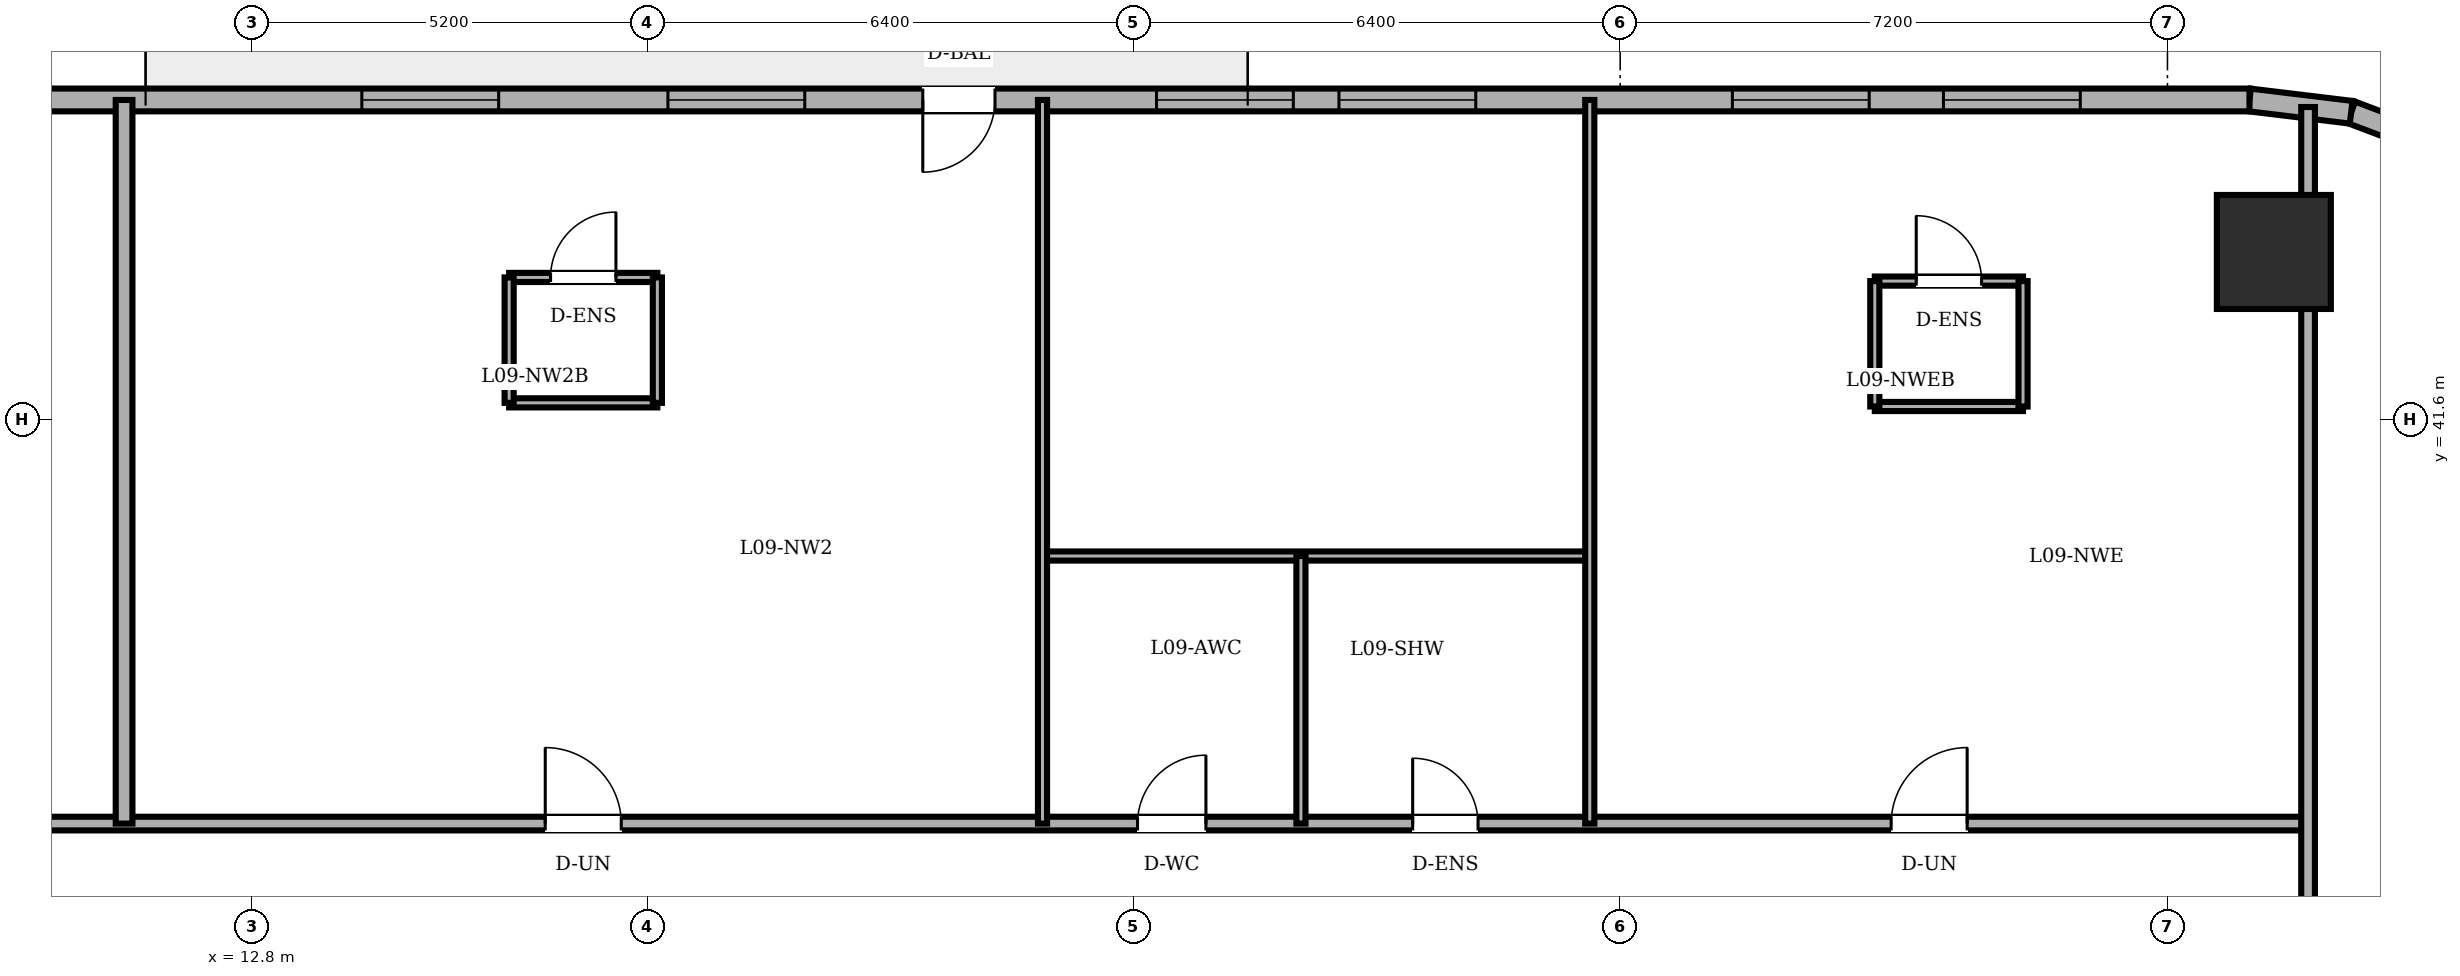
"""IFC4 building model, lengths in metres.
Left out: names, types, materials, properties, quantities, classifications, styles, units other than length and angle.
Written with IfcOpenShell. Run it as: python <this file> out.ifc"""

import sys

from ifc_helpers import new_model, si_unit, direction, frame, frame_2d, origin, origin_2d, place, context, subcontext, project, spatial, rectangle, circle, extrude, element, fill, save


model = new_model("IFC4")
c1 = context("Model", 3, precision=1e-05, world=origin(), true_north=direction((0.0, 1.0)))
c2 = subcontext(c1, "Body", "Model", "MODEL_VIEW")
j1 = project(units=[si_unit("LENGTHUNIT", "METRE"), si_unit("PLANEANGLEUNIT", "RADIAN")], contexts=[c1])
p1 = place(None, origin())
s1 = spatial("IfcSite", under=j1, at=p1, CompositionType="ELEMENT")
p2 = place(p1, origin())
s2 = spatial("IfcBuilding", under=s1, at=p2, CompositionType="ELEMENT")
p3 = place(p2, frame((0.0, 0.0, 36.0)))
s3 = spatial("IfcBuildingStorey", under=s2, at=p3, CompositionType="ELEMENT", Elevation=36.0)
p4 = place(p3, frame((39.4, 43.8, 0.0), z_axis=(0.0, 0.0, 1.0), x_axis=(1.0, 0.0, 0.0)))
e1 = element("IfcColumn", 1, at=p4, inside=s3, PredefinedType="COLUMN", context=c2, shape_type="SweptSolid", body=[
    extrude(circle(Radius=0.75, at=origin_2d()), origin(), (0.0, 0.0, 1.0), 3.6),
])
p5 = place(p3, frame((41.679, 45.16, 0.0), z_axis=(0.0, 0.0, 1.0), x_axis=(-0.935156721165, 0.354234254216, 0.0)))
e2 = element("IfcWall", 2, at=p5, inside=s3, PredefinedType="SOLIDWALL", context=c2, shape_type="SweptSolid", body=[
    extrude(rectangle(XDim=1.349, YDim=0.3, at=frame_2d((0.675, 0.0))), origin(), (0.0, 0.0, 1.0), 3.4),
])
p6 = place(p3, frame((40.417, 45.638, 0.0), z_axis=(0.0, 0.0, 1.0), x_axis=(-0.992739027259, 0.120288086515, 0.0)))
e3 = element("IfcWall", 3, at=p6, inside=s3, PredefinedType="SOLIDWALL", context=c2, shape_type="SweptSolid", body=[
    extrude(rectangle(XDim=1.348, YDim=0.3, at=frame_2d((0.674, 0.0))), origin(), (0.0, 0.0, 1.0), 3.4),
])
p7 = place(p3, frame((39.079, 45.8, 0.0), z_axis=(0.0, 0.0, 1.0), x_axis=(-1.0, 0.0, 0.0)))
e4 = element("IfcWall", 4, at=p7, inside=s3, PredefinedType="SOLIDWALL", context=c2, shape_type="SweptSolid", body=[
    extrude(rectangle(XDim=30.079, YDim=0.3, at=frame_2d((15.04, 0.0))), origin(), (0.0, 0.0, 1.0), 3.4),
])
p8 = place(p7, frame((16.504, 0.0, 0.0)))
e5 = element("IfcOpeningElement", 5, at=p8, cuts=e4, PredefinedType="OPENING", context=c2, shape_type="SweptSolid", body=[
    extrude(rectangle(XDim=0.95, YDim=2.2, at=frame_2d((0.475, 1.1))), frame((0.0, 0.16, 0.0), z_axis=(0.0, -1.0, 0.0), x_axis=(1.0, 0.0, 0.0)), (0.0, 0.0, 1.0), 0.32),
])
p9 = place(p7, frame((2.226, 0.0, 0.85)))
e6 = element("IfcOpeningElement", 6, at=p9, cuts=e4, PredefinedType="OPENING", context=c2, shape_type="SweptSolid", body=[
    extrude(rectangle(XDim=1.8, YDim=1.55, at=frame_2d((0.9, 0.775))), frame((0.0, 0.16, 0.0), z_axis=(0.0, -1.0, 0.0), x_axis=(1.0, 0.0, 0.0)), (0.0, 0.0, 1.0), 0.32),
])
p10 = place(p7, frame((5.003, 0.0, 0.85)))
e7 = element("IfcOpeningElement", 7, at=p10, cuts=e4, PredefinedType="OPENING", context=c2, shape_type="SweptSolid", body=[
    extrude(rectangle(XDim=1.8, YDim=1.55, at=frame_2d((0.9, 0.775))), frame((0.0, 0.16, 0.0), z_axis=(0.0, -1.0, 0.0), x_axis=(1.0, 0.0, 0.0)), (0.0, 0.0, 1.0), 0.32),
])
p11 = place(p7, frame((10.179, 0.0, 0.85)))
e8 = element("IfcOpeningElement", 8, at=p11, cuts=e4, PredefinedType="OPENING", context=c2, shape_type="SweptSolid", body=[
    extrude(rectangle(XDim=1.8, YDim=1.55, at=frame_2d((0.9, 0.775))), frame((0.0, 0.16, 0.0), z_axis=(0.0, -1.0, 0.0), x_axis=(1.0, 0.0, 0.0)), (0.0, 0.0, 1.0), 0.32),
])
p12 = place(p7, frame((12.579, 0.0, 0.85)))
e9 = element("IfcOpeningElement", 9, at=p12, cuts=e4, PredefinedType="OPENING", context=c2, shape_type="SweptSolid", body=[
    extrude(rectangle(XDim=1.8, YDim=1.55, at=frame_2d((0.9, 0.775))), frame((0.0, 0.16, 0.0), z_axis=(0.0, -1.0, 0.0), x_axis=(1.0, 0.0, 0.0)), (0.0, 0.0, 1.0), 0.32),
])
p13 = place(p7, frame((19.007, 0.0, 0.85)))
e10 = element("IfcOpeningElement", 10, at=p13, cuts=e4, PredefinedType="OPENING", context=c2, shape_type="SweptSolid", body=[
    extrude(rectangle(XDim=1.8, YDim=1.55, at=frame_2d((0.9, 0.775))), frame((0.0, 0.16, 0.0), z_axis=(0.0, -1.0, 0.0), x_axis=(1.0, 0.0, 0.0)), (0.0, 0.0, 1.0), 0.32),
])
p14 = place(p7, frame((23.034, 0.0, 0.85)))
e11 = element("IfcOpeningElement", 11, at=p14, cuts=e4, PredefinedType="OPENING", context=c2, shape_type="SweptSolid", body=[
    extrude(rectangle(XDim=1.8, YDim=1.55, at=frame_2d((0.9, 0.775))), frame((0.0, 0.16, 0.0), z_axis=(0.0, -1.0, 0.0), x_axis=(1.0, 0.0, 0.0)), (0.0, 0.0, 1.0), 0.32),
])
p15 = place(p3, frame((16.183, 43.465, 0.0), z_axis=(0.0, 0.0, 1.0), x_axis=(1.0, 0.0, 0.0)))
e12 = element("IfcWall", 12, at=p15, inside=s3, PredefinedType="PARTITIONING", context=c2, shape_type="SweptSolid", body=[
    extrude(rectangle(XDim=1.95, YDim=0.12, at=frame_2d((0.975, 0.0))), origin(), (0.0, 0.0, 1.0), 2.882),
])
p16 = place(p15, frame((0.545, 0.0, 0.0)))
e13 = element("IfcOpeningElement", 13, at=p16, cuts=e12, PredefinedType="OPENING", context=c2, shape_type="SweptSolid", body=[
    extrude(rectangle(XDim=0.86, YDim=2.1, at=frame_2d((0.43, 1.05))), frame((0.0, 0.07, 0.0), z_axis=(0.0, -1.0, 0.0), x_axis=(1.0, 0.0, 0.0)), (0.0, 0.0, 1.0), 0.14),
])
p17 = place(p3, frame((18.133, 41.815, 0.0), z_axis=(0.0, 0.0, 1.0), x_axis=(-1.0, 0.0, 0.0)))
e14 = element("IfcWall", 14, at=p17, inside=s3, PredefinedType="PARTITIONING", context=c2, shape_type="SweptSolid", body=[
    extrude(rectangle(XDim=1.95, YDim=0.12, at=frame_2d((0.975, 0.0))), origin(), (0.0, 0.0, 1.0), 3.4),
])
for number, where, z_axis, x_axis in (
    (15, (16.183, 43.465, 0.0), (0.0, 0.0, 1.0), (0.0, -1.0, 0.0)),
    (16, (18.133, 41.815, 0.0), (0.0, 0.0, 1.0), (0.0, 1.0, 0.0)),
):
    element("IfcWall", number, at=place(p3, frame(where, z_axis=z_axis, x_axis=x_axis)), inside=s3, PredefinedType="PARTITIONING", context=c2, shape_type="SweptSolid", body=[
        extrude(rectangle(XDim=1.65, YDim=0.12, at=frame_2d((0.825, 0.0))), origin(), (0.0, 0.0, 1.0), 3.4),
    ])
p18 = place(p3, frame((34.15, 43.417, 0.0), z_axis=(0.0, 0.0, 1.0), x_axis=(1.0, 0.0, 0.0)))
e17 = element("IfcWall", 17, at=p18, inside=s3, PredefinedType="PARTITIONING", context=c2, shape_type="SweptSolid", body=[
    extrude(rectangle(XDim=1.95, YDim=0.12, at=frame_2d((0.975, 0.0))), origin(), (0.0, 0.0, 1.0), 3.4),
])
p19 = place(p18, frame((0.545, 0.0, 0.0)))
e18 = element("IfcOpeningElement", 18, at=p19, cuts=e17, PredefinedType="OPENING", context=c2, shape_type="SweptSolid", body=[
    extrude(rectangle(XDim=0.86, YDim=2.1, at=frame_2d((0.43, 1.05))), frame((0.0, 0.07, 0.0), z_axis=(0.0, -1.0, 0.0), x_axis=(1.0, 0.0, 0.0)), (0.0, 0.0, 1.0), 0.14),
])
p20 = place(p3, frame((36.1, 41.767, 0.0), z_axis=(0.0, 0.0, 1.0), x_axis=(-1.0, 0.0, 0.0)))
e19 = element("IfcWall", 19, at=p20, inside=s3, PredefinedType="PARTITIONING", context=c2, shape_type="SweptSolid", body=[
    extrude(rectangle(XDim=1.95, YDim=0.12, at=frame_2d((0.975, 0.0))), origin(), (0.0, 0.0, 1.0), 3.4),
])
for number, where, z_axis, x_axis in (
    (20, (34.15, 43.417, 0.0), (0.0, 0.0, 1.0), (0.0, -1.0, 0.0)),
    (21, (36.1, 41.767, 0.0), (0.0, 0.0, 1.0), (0.0, 1.0, 0.0)),
):
    element("IfcWall", number, at=place(p3, frame(where, z_axis=z_axis, x_axis=x_axis)), inside=s3, PredefinedType="PARTITIONING", context=c2, shape_type="SweptSolid", body=[
        extrude(rectangle(XDim=1.65, YDim=0.12, at=frame_2d((0.825, 0.0))), origin(), (0.0, 0.0, 1.0), 3.4),
    ])
p21 = place(p3, frame((3.4, 36.28, 0.0), z_axis=(0.0, 0.0, 1.0), x_axis=(1.0, 0.0, 0.0)))
e22 = element("IfcWall", 22, at=p21, inside=s3, PredefinedType="PARTITIONING", context=c2, shape_type="SweptSolid", body=[
    extrude(rectangle(XDim=36.45, YDim=0.18, at=frame_2d((18.225, 0.0))), origin(), (0.0, 0.0, 1.0), 3.4),
])
p22 = place(p21, frame((21.05, 0.0, 0.0)))
e23 = element("IfcOpeningElement", 23, at=p22, cuts=e22, PredefinedType="OPENING", context=c2, shape_type="SweptSolid", body=[
    extrude(rectangle(XDim=0.9, YDim=2.1, at=frame_2d((0.45, 1.05))), frame((0.0, 0.1, 0.0), z_axis=(0.0, -1.0, 0.0), x_axis=(1.0, 0.0, 0.0)), (0.0, 0.0, 1.0), 0.2),
])
p23 = place(p21, frame((24.67, 0.0, 0.0)))
e24 = element("IfcOpeningElement", 24, at=p23, cuts=e22, PredefinedType="OPENING", context=c2, shape_type="SweptSolid", body=[
    extrude(rectangle(XDim=0.86, YDim=2.1, at=frame_2d((0.43, 1.05))), frame((0.0, 0.1, 0.0), z_axis=(0.0, -1.0, 0.0), x_axis=(1.0, 0.0, 0.0)), (0.0, 0.0, 1.0), 0.2),
])
p24 = place(p21, frame((4.659, 0.0, 0.0)))
e25 = element("IfcOpeningElement", 25, at=p24, cuts=e22, PredefinedType="OPENING", context=c2, shape_type="SweptSolid", body=[
    extrude(rectangle(XDim=1.0, YDim=2.15, at=frame_2d((0.5, 1.075))), frame((0.0, 0.1, 0.0), z_axis=(0.0, -1.0, 0.0), x_axis=(1.0, 0.0, 0.0)), (0.0, 0.0, 1.0), 0.2),
])
p25 = place(p21, frame((13.258, 0.0, 0.0)))
e26 = element("IfcOpeningElement", 26, at=p25, cuts=e22, PredefinedType="OPENING", context=c2, shape_type="SweptSolid", body=[
    extrude(rectangle(XDim=1.0, YDim=2.15, at=frame_2d((0.5, 1.075))), frame((0.0, 0.1, 0.0), z_axis=(0.0, -1.0, 0.0), x_axis=(1.0, 0.0, 0.0)), (0.0, 0.0, 1.0), 0.2),
])
p26 = place(p21, frame((30.965, 0.0, 0.0)))
e27 = element("IfcOpeningElement", 27, at=p26, cuts=e22, PredefinedType="OPENING", context=c2, shape_type="SweptSolid", body=[
    extrude(rectangle(XDim=1.0, YDim=2.15, at=frame_2d((0.5, 1.075))), frame((0.0, 0.1, 0.0), z_axis=(0.0, -1.0, 0.0), x_axis=(1.0, 0.0, 0.0)), (0.0, 0.0, 1.0), 0.2),
])
p27 = place(p3, frame((23.2, 39.8, 0.0), z_axis=(0.0, 0.0, 1.0), x_axis=(1.0, 0.0, 0.0)))
e28 = element("IfcWall", 28, at=p27, inside=s3, PredefinedType="PARTITIONING", context=c2, shape_type="SweptSolid", body=[
    extrude(rectangle(XDim=7.2, YDim=0.12, at=frame_2d((3.6, 0.0))), origin(), (0.0, 0.0, 1.0), 3.4),
])
p28 = place(p3, frame((11.117, 36.28, 0.0), z_axis=(0.0, 0.0, 1.0), x_axis=(0.0, 1.0, 0.0)))
e29 = element("IfcWall", 29, at=p28, inside=s3, PredefinedType="PARTITIONING", context=c2, shape_type="SweptSolid", body=[
    extrude(rectangle(XDim=9.52, YDim=0.22, at=frame_2d((4.76, 0.0))), origin(), (0.0, 0.0, 1.0), 3.4),
])
p29 = place(p3, frame((23.2, 36.28, 0.0), z_axis=(0.0, 0.0, 1.0), x_axis=(0.0, 1.0, 0.0)))
e30 = element("IfcWall", 30, at=p29, inside=s3, PredefinedType="PARTITIONING", context=c2, shape_type="SweptSolid", body=[
    extrude(rectangle(XDim=9.52, YDim=0.12, at=frame_2d((4.76, 0.0))), origin(), (0.0, 0.0, 1.0), 3.4),
])
p30 = place(p3, frame((26.6, 36.28, 0.0), z_axis=(0.0, 0.0, 1.0), x_axis=(0.0, 1.0, 0.0)))
e31 = element("IfcWall", 31, at=p30, inside=s3, PredefinedType="PARTITIONING", context=c2, shape_type="SweptSolid", body=[
    extrude(rectangle(XDim=3.52, YDim=0.12, at=frame_2d((1.76, 0.0))), origin(), (0.0, 0.0, 1.0), 3.4),
])
p31 = place(p3, frame((30.4, 36.28, 0.0), z_axis=(0.0, 0.0, 1.0), x_axis=(0.0, 1.0, 0.0)))
e32 = element("IfcWall", 32, at=p31, inside=s3, PredefinedType="PARTITIONING", context=c2, shape_type="SweptSolid", body=[
    extrude(rectangle(XDim=9.52, YDim=0.12, at=frame_2d((4.76, 0.0))), origin(), (0.0, 0.0, 1.0), 3.4),
])
p32 = place(p3, frame((39.85, 25.18, 0.0), z_axis=(0.0, 0.0, 1.0), x_axis=(0.0, 1.0, 0.0)))
e33 = element("IfcWall", 33, at=p32, inside=s3, PredefinedType="PARTITIONING", context=c2, shape_type="SweptSolid", body=[
    extrude(rectangle(XDim=20.527, YDim=0.18, at=frame_2d((10.264, 0.0))), origin(), (0.0, 0.0, 1.0), 2.782),
])
p33 = place(p32, frame((5.35, 0.0, 0.0)))
e34 = element("IfcOpeningElement", 34, at=p33, cuts=e33, PredefinedType="OPENING", context=c2, shape_type="SweptSolid", body=[
    extrude(rectangle(XDim=0.92, YDim=2.1, at=frame_2d((0.46, 1.05))), frame((0.0, 0.1, 0.0), z_axis=(0.0, -1.0, 0.0), x_axis=(1.0, 0.0, 0.0)), (0.0, 0.0, 1.0), 0.2),
])
p34 = place(p8, origin())
e35 = element("IfcDoor", 35, at=p34, inside=s3, OperationType="SINGLE_SWING_RIGHT", PredefinedType="DOOR", context=c2, shape_type="SweptSolid", body=[
    extrude(rectangle(XDim=0.95, YDim=2.2, at=frame_2d((0.475, 1.1))), frame((0.0, 0.025, 0.0), z_axis=(0.0, -1.0, 0.0), x_axis=(1.0, 0.0, 0.0)), (0.0, 0.0, 1.0), 0.05),
])
fill(e5, e35)
p35 = place(p9, origin())
e36 = element("IfcWindow", 36, at=p35, inside=s3, PartitioningType="DOUBLE_PANEL_VERTICAL", PredefinedType="WINDOW", context=c2, shape_type="SweptSolid", body=[
    extrude(rectangle(XDim=1.8, YDim=1.55, at=frame_2d((0.9, 0.775))), frame((0.0, 0.03, 0.0), z_axis=(0.0, -1.0, 0.0), x_axis=(1.0, 0.0, 0.0)), (0.0, 0.0, 1.0), 0.06),
])
fill(e6, e36)
p36 = place(p10, origin())
e37 = element("IfcWindow", 37, at=p36, inside=s3, PartitioningType="DOUBLE_PANEL_VERTICAL", PredefinedType="WINDOW", context=c2, shape_type="SweptSolid", body=[
    extrude(rectangle(XDim=1.8, YDim=1.55, at=frame_2d((0.9, 0.775))), frame((0.0, 0.03, 0.0), z_axis=(0.0, -1.0, 0.0), x_axis=(1.0, 0.0, 0.0)), (0.0, 0.0, 1.0), 0.06),
])
fill(e7, e37)
p37 = place(p11, origin())
e38 = element("IfcWindow", 38, at=p37, inside=s3, PartitioningType="DOUBLE_PANEL_VERTICAL", PredefinedType="WINDOW", context=c2, shape_type="SweptSolid", body=[
    extrude(rectangle(XDim=1.8, YDim=1.55, at=frame_2d((0.9, 0.775))), frame((0.0, 0.03, 0.0), z_axis=(0.0, -1.0, 0.0), x_axis=(1.0, 0.0, 0.0)), (0.0, 0.0, 1.0), 0.06),
])
fill(e8, e38)
p38 = place(p12, origin())
e39 = element("IfcWindow", 39, at=p38, inside=s3, PartitioningType="DOUBLE_PANEL_VERTICAL", PredefinedType="WINDOW", context=c2, shape_type="SweptSolid", body=[
    extrude(rectangle(XDim=1.8, YDim=1.55, at=frame_2d((0.9, 0.775))), frame((0.0, 0.03, 0.0), z_axis=(0.0, -1.0, 0.0), x_axis=(1.0, 0.0, 0.0)), (0.0, 0.0, 1.0), 0.06),
])
fill(e9, e39)
p39 = place(p13, origin())
e40 = element("IfcWindow", 40, at=p39, inside=s3, PartitioningType="DOUBLE_PANEL_VERTICAL", PredefinedType="WINDOW", context=c2, shape_type="SweptSolid", body=[
    extrude(rectangle(XDim=1.8, YDim=1.55, at=frame_2d((0.9, 0.775))), frame((0.0, 0.03, 0.0), z_axis=(0.0, -1.0, 0.0), x_axis=(1.0, 0.0, 0.0)), (0.0, 0.0, 1.0), 0.06),
])
fill(e10, e40)
p40 = place(p14, origin())
e41 = element("IfcWindow", 41, at=p40, inside=s3, PartitioningType="DOUBLE_PANEL_VERTICAL", PredefinedType="WINDOW", context=c2, shape_type="SweptSolid", body=[
    extrude(rectangle(XDim=1.8, YDim=1.55, at=frame_2d((0.9, 0.775))), frame((0.0, 0.03, 0.0), z_axis=(0.0, -1.0, 0.0), x_axis=(1.0, 0.0, 0.0)), (0.0, 0.0, 1.0), 0.06),
])
fill(e11, e41)
p41 = place(p16, origin())
e42 = element("IfcDoor", 42, at=p41, inside=s3, OperationType="SINGLE_SWING_RIGHT", PredefinedType="DOOR", context=c2, shape_type="SweptSolid", body=[
    extrude(rectangle(XDim=0.86, YDim=2.1, at=frame_2d((0.43, 1.05))), frame((0.0, 0.025, 0.0), z_axis=(0.0, -1.0, 0.0), x_axis=(1.0, 0.0, 0.0)), (0.0, 0.0, 1.0), 0.05),
])
fill(e13, e42)
p42 = place(p19, origin())
e43 = element("IfcDoor", 43, at=p42, inside=s3, OperationType="SINGLE_SWING_LEFT", PredefinedType="DOOR", context=c2, shape_type="SweptSolid", body=[
    extrude(rectangle(XDim=0.86, YDim=2.1, at=frame_2d((0.43, 1.05))), frame((0.0, 0.025, 0.0), z_axis=(0.0, -1.0, 0.0), x_axis=(1.0, 0.0, 0.0)), (0.0, 0.0, 1.0), 0.05),
])
fill(e18, e43)
p43 = place(p22, origin())
e44 = element("IfcDoor", 44, at=p43, inside=s3, OperationType="SINGLE_SWING_RIGHT", PredefinedType="DOOR", context=c2, shape_type="SweptSolid", body=[
    extrude(rectangle(XDim=0.9, YDim=2.1, at=frame_2d((0.45, 1.05))), frame((0.0, 0.025, 0.0), z_axis=(0.0, -1.0, 0.0), x_axis=(1.0, 0.0, 0.0)), (0.0, 0.0, 1.0), 0.05),
])
fill(e23, e44)
p44 = place(p23, origin())
e45 = element("IfcDoor", 45, at=p44, inside=s3, OperationType="SINGLE_SWING_LEFT", PredefinedType="DOOR", context=c2, shape_type="SweptSolid", body=[
    extrude(rectangle(XDim=0.86, YDim=2.1, at=frame_2d((0.43, 1.05))), frame((0.0, 0.025, 0.0), z_axis=(0.0, -1.0, 0.0), x_axis=(1.0, 0.0, 0.0)), (0.0, 0.0, 1.0), 0.05),
])
fill(e24, e45)
p45 = place(p25, origin())
e46 = element("IfcDoor", 46, at=p45, inside=s3, OperationType="SINGLE_SWING_LEFT", PredefinedType="DOOR", context=c2, shape_type="SweptSolid", body=[
    extrude(rectangle(XDim=1.0, YDim=2.15, at=frame_2d((0.5, 1.075))), frame((0.0, 0.025, 0.0), z_axis=(0.0, -1.0, 0.0), x_axis=(1.0, 0.0, 0.0)), (0.0, 0.0, 1.0), 0.05),
])
fill(e26, e46)
p46 = place(p26, origin())
e47 = element("IfcDoor", 47, at=p46, inside=s3, OperationType="SINGLE_SWING_RIGHT", PredefinedType="DOOR", context=c2, shape_type="SweptSolid", body=[
    extrude(rectangle(XDim=1.0, YDim=2.15, at=frame_2d((0.5, 1.075))), frame((0.0, 0.025, 0.0), z_axis=(0.0, -1.0, 0.0), x_axis=(1.0, 0.0, 0.0)), (0.0, 0.0, 1.0), 0.05),
])
fill(e27, e47)
save(model, sys.argv[1])
